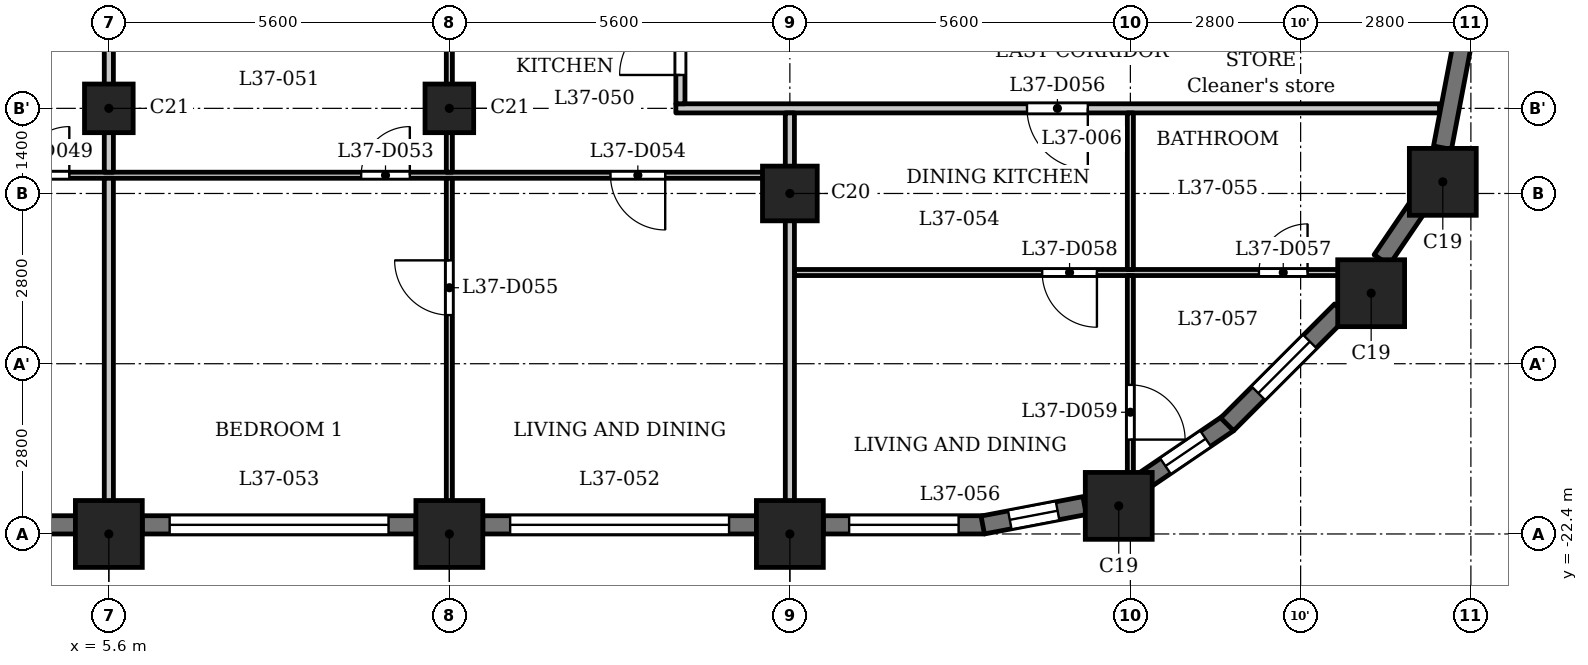
"""IFC4 building model, lengths in metres.
Left out: names, types, materials, properties, quantities, classifications, styles, units other than length and angle.
Written with IfcOpenShell. Run it as: python <this file> out.ifc"""

import sys

from ifc_helpers import new_model, si_unit, direction, frame, frame_2d, origin, origin_2d, place, context, subcontext, project, spatial, rectangle, extrude, element, fill, save


model = new_model("IFC4")
c1 = context("Model", 3, precision=1e-05, world=origin(), true_north=direction((0.0, 1.0)))
c2 = subcontext(c1, "Body", "Model", "MODEL_VIEW")
j1 = project(units=[si_unit("LENGTHUNIT", "METRE"), si_unit("PLANEANGLEUNIT", "RADIAN")], contexts=[c1])
p1 = place(None, origin())
s1 = spatial("IfcSite", under=j1, at=p1, CompositionType="ELEMENT")
p2 = place(p1, origin())
s2 = spatial("IfcBuilding", under=s1, at=p2, CompositionType="ELEMENT")
p3 = place(p2, frame((0.0, 0.0, 146.6)))
s3 = spatial("IfcBuildingStorey", under=s2, at=p3, CompositionType="ELEMENT", Elevation=146.6)
for number, where, z_axis, x_axis in (
    (1, (5.6, -22.4, 0.0), (0.0, 0.0, 1.0), (1.0, 0.0, 0.0)),
    (2, (11.2, -22.4, 0.0), (0.0, 0.0, 1.0), (1.0, 0.0, 0.0)),
    (3, (16.8, -22.4, 0.0), (0.0, 0.0, 1.0), (1.0, 0.0, 0.0)),
    (4, (22.209, -21.938, 0.0), (0.0, 0.0, 1.0), (1.0, 0.0, 0.0)),
    (5, (26.36, -18.44, 0.0), (0.0, 0.0, 1.0), (1.0, 0.0, 0.0)),
    (6, (27.538, -16.609, 0.0), (0.0, 0.0, 1.0), (1.0, 0.0, 0.0)),
):
    element("IfcColumn", number, at=place(p3, frame(where, z_axis=z_axis, x_axis=x_axis)), inside=s3, PredefinedType="COLUMN", context=c2, shape_type="SweptSolid", body=[
        extrude(rectangle(XDim=1.1, YDim=1.1, at=origin_2d()), origin(), (0.0, 0.0, 1.0), 3.5),
    ])
p4 = place(p3, frame((16.8, -16.8, 0.0), z_axis=(0.0, 0.0, 1.0), x_axis=(1.0, 0.0, 0.0)))
e7 = element("IfcColumn", 7, at=p4, inside=s3, PredefinedType="COLUMN", context=c2, shape_type="SweptSolid", body=[
    extrude(rectangle(XDim=0.9, YDim=0.9, at=origin_2d()), origin(), (0.0, 0.0, 1.0), 3.5),
])
for number, where, z_axis, x_axis in (
    (8, (5.6, -15.4, 0.0), (0.0, 0.0, 1.0), (1.0, 0.0, 0.0)),
    (9, (11.2, -15.4, 0.0), (0.0, 0.0, 1.0), (1.0, 0.0, 0.0)),
):
    element("IfcColumn", number, at=place(p3, frame(where, z_axis=z_axis, x_axis=x_axis)), inside=s3, PredefinedType="COLUMN", context=c2, shape_type="SweptSolid", body=[
        extrude(rectangle(XDim=0.8, YDim=0.8, at=origin_2d()), origin(), (0.0, 0.0, 1.0), 3.5),
    ])
p5 = place(p3, frame((0.55, -22.25, 0.0), z_axis=(0.0, 0.0, 1.0), x_axis=(1.0, 0.0, 0.0)))
e10 = element("IfcWall", 10, at=p5, inside=s3, PredefinedType="SOLIDWALL", context=c2, shape_type="SweptSolid", body=[
    extrude(rectangle(XDim=4.5, YDim=0.3, at=frame_2d((2.25, 0.0))), origin(), (0.0, 0.0, 1.0), 2.45),
])
p6 = place(p5, frame((0.45, 0.0, 1.2)))
e11 = element("IfcOpeningElement", 11, at=p6, cuts=e10, PredefinedType="OPENING", context=c2, shape_type="SweptSolid", body=[
    extrude(rectangle(XDim=3.6, YDim=0.95, at=frame_2d((1.8, 0.475))), frame((0.0, 0.16, 0.0), z_axis=(0.0, -1.0, 0.0), x_axis=(1.0, 0.0, 0.0)), (0.0, 0.0, 1.0), 0.32),
])
p7 = place(p3, frame((6.15, -22.25, 0.0), z_axis=(0.0, 0.0, 1.0), x_axis=(1.0, 0.0, 0.0)))
e12 = element("IfcWall", 12, at=p7, inside=s3, PredefinedType="SOLIDWALL", context=c2, shape_type="SweptSolid", body=[
    extrude(rectangle(XDim=4.5, YDim=0.3, at=frame_2d((2.25, 0.0))), origin(), (0.0, 0.0, 1.0), 2.45),
])
p8 = place(p7, frame((0.45, 0.0, 1.2)))
e13 = element("IfcOpeningElement", 13, at=p8, cuts=e12, PredefinedType="OPENING", context=c2, shape_type="SweptSolid", body=[
    extrude(rectangle(XDim=3.6, YDim=0.95, at=frame_2d((1.8, 0.475))), frame((0.0, 0.16, 0.0), z_axis=(0.0, -1.0, 0.0), x_axis=(1.0, 0.0, 0.0)), (0.0, 0.0, 1.0), 0.32),
])
p9 = place(p3, frame((11.75, -22.25, 0.0), z_axis=(0.0, 0.0, 1.0), x_axis=(1.0, 0.0, 0.0)))
e14 = element("IfcWall", 14, at=p9, inside=s3, PredefinedType="SOLIDWALL", context=c2, shape_type="SweptSolid", body=[
    extrude(rectangle(XDim=4.5, YDim=0.3, at=frame_2d((2.25, 0.0))), origin(), (0.0, 0.0, 1.0), 2.45),
])
p10 = place(p9, frame((0.45, 0.0, 1.2)))
e15 = element("IfcOpeningElement", 15, at=p10, cuts=e14, PredefinedType="OPENING", context=c2, shape_type="SweptSolid", body=[
    extrude(rectangle(XDim=3.6, YDim=0.95, at=frame_2d((1.8, 0.475))), frame((0.0, 0.16, 0.0), z_axis=(0.0, -1.0, 0.0), x_axis=(1.0, 0.0, 0.0)), (0.0, 0.0, 1.0), 0.32),
])
p11 = place(p3, frame((17.35, -22.25, 0.0), z_axis=(0.0, 0.0, 1.0), x_axis=(1.0, 0.0, 0.0)))
e16 = element("IfcWall", 16, at=p11, inside=s3, PredefinedType="SOLIDWALL", context=c2, shape_type="SweptSolid", body=[
    extrude(rectangle(XDim=2.65, YDim=0.3, at=frame_2d((1.325, 0.0))), origin(), (0.0, 0.0, 1.0), 2.45),
])
p12 = place(p11, frame((0.425, 0.0, 0.9)))
e17 = element("IfcOpeningElement", 17, at=p12, cuts=e16, PredefinedType="OPENING", context=c2, shape_type="SweptSolid", body=[
    extrude(rectangle(XDim=1.8, YDim=1.25, at=frame_2d((0.9, 0.625))), frame((0.0, 0.16, 0.0), z_axis=(0.0, -1.0, 0.0), x_axis=(1.0, 0.0, 0.0)), (0.0, 0.0, 1.0), 0.32),
])
p13 = place(p3, frame((19.972, -22.253, 0.0), z_axis=(0.0, 0.0, 1.0), x_axis=(0.982297206936, 0.187329114784, 0.0)))
e18 = element("IfcWall", 18, at=p13, inside=s3, PredefinedType="SOLIDWALL", context=c2, shape_type="SweptSolid", body=[
    extrude(rectangle(XDim=1.706, YDim=0.3, at=frame_2d((0.853, 0.0))), origin(), (0.0, 0.0, 1.0), 2.45),
])
p14 = place(p13, frame((0.453, 0.0, 0.6)))
e19 = element("IfcOpeningElement", 19, at=p14, cuts=e18, PredefinedType="OPENING", context=c2, shape_type="SweptSolid", body=[
    extrude(rectangle(XDim=0.8, YDim=1.55, at=frame_2d((0.4, 0.775))), frame((0.0, 0.16, 0.0), z_axis=(0.0, -1.0, 0.0), x_axis=(1.0, 0.0, 0.0)), (0.0, 0.0, 1.0), 0.32),
])
p15 = place(p3, frame((22.602, -21.538, 0.0), z_axis=(0.0, 0.0, 1.0), x_axis=(0.827040942766, 0.562141689424, 0.0)))
e20 = element("IfcWall", 20, at=p15, inside=s3, PredefinedType="SOLIDWALL", context=c2, shape_type="SweptSolid", body=[
    extrude(rectangle(XDim=1.706, YDim=0.3, at=frame_2d((0.853, 0.0))), origin(), (0.0, 0.0, 1.0), 2.45),
])
p16 = place(p15, frame((0.453, 0.0, 0.6)))
e21 = element("IfcOpeningElement", 21, at=p16, cuts=e20, PredefinedType="OPENING", context=c2, shape_type="SweptSolid", body=[
    extrude(rectangle(XDim=0.8, YDim=1.55, at=frame_2d((0.4, 0.775))), frame((0.0, 0.16, 0.0), z_axis=(0.0, -1.0, 0.0), x_axis=(1.0, 0.0, 0.0)), (0.0, 0.0, 1.0), 0.32),
])
p17 = place(p3, frame((23.991, -20.597, 0.0), z_axis=(0.0, 0.0, 1.0), x_axis=(0.707106781187, 0.707106781187, 0.0)))
e22 = element("IfcWall", 22, at=p17, inside=s3, PredefinedType="SOLIDWALL", context=c2, shape_type="SweptSolid", body=[
    extrude(rectangle(XDim=2.65, YDim=0.3, at=frame_2d((1.325, 0.0))), origin(), (0.0, 0.0, 1.0), 2.45),
])
p18 = place(p17, frame((0.725, 0.0, 0.6)))
e23 = element("IfcOpeningElement", 23, at=p18, cuts=e22, PredefinedType="OPENING", context=c2, shape_type="SweptSolid", body=[
    extrude(rectangle(XDim=1.2, YDim=1.55, at=frame_2d((0.6, 0.775))), frame((0.0, 0.16, 0.0), z_axis=(0.0, -1.0, 0.0), x_axis=(1.0, 0.0, 0.0)), (0.0, 0.0, 1.0), 0.32),
])
p19 = place(p3, frame((26.532, -17.893, 0.0), z_axis=(0.0, 0.0, 1.0), x_axis=(0.562105419172, 0.82706559458, 0.0)))
e24 = element("IfcWall", 24, at=p19, inside=s3, PredefinedType="SOLIDWALL", context=c2, shape_type="SweptSolid", body=[
    extrude(rectangle(XDim=1.077, YDim=0.3, at=frame_2d((0.539, 0.0))), origin(), (0.0, 0.0, 1.0), 3.2),
])
p20 = place(p3, frame((27.533, -16.048, 0.0), z_axis=(0.0, 0.0, 1.0), x_axis=(0.187302784601, 0.982302227871, 0.0)))
e25 = element("IfcWall", 25, at=p20, inside=s3, PredefinedType="SOLIDWALL", context=c2, shape_type="SweptSolid", body=[
    extrude(rectangle(XDim=1.706, YDim=0.3, at=frame_2d((0.853, 0.0))), origin(), (0.0, 0.0, 1.0), 2.45),
])
p21 = place(p3, frame((16.875, -18.1, 0.0), z_axis=(0.0, 0.0, 1.0), x_axis=(1.0, 0.0, 0.0)))
e26 = element("IfcWall", 26, at=p21, inside=s3, PredefinedType="PARTITIONING", context=c2, shape_type="SweptSolid", body=[
    extrude(rectangle(XDim=9.565, YDim=0.1, at=frame_2d((4.782, 0.0))), origin(), (0.0, 0.0, 1.0), 3.2),
])
p22 = place(p21, frame((7.639, 0.0, 0.0)))
e27 = element("IfcOpeningElement", 27, at=p22, cuts=e26, PredefinedType="OPENING", context=c2, shape_type="SweptSolid", body=[
    extrude(rectangle(XDim=0.8, YDim=2.1, at=frame_2d((0.4, 1.05))), frame((0.0, 0.06, 0.0), z_axis=(0.0, -1.0, 0.0), x_axis=(1.0, 0.0, 0.0)), (0.0, 0.0, 1.0), 0.12),
])
p23 = place(p21, frame((4.075, 0.0, 0.0)))
e28 = element("IfcOpeningElement", 28, at=p23, cuts=e26, PredefinedType="OPENING", context=c2, shape_type="SweptSolid", body=[
    extrude(rectangle(XDim=0.9, YDim=2.1, at=frame_2d((0.45, 1.05))), frame((0.0, 0.06, 0.0), z_axis=(0.0, -1.0, 0.0), x_axis=(1.0, 0.0, 0.0)), (0.0, 0.0, 1.0), 0.12),
])
p24 = place(p3, frame((-16.725, -16.5, 0.0), z_axis=(0.0, 0.0, 1.0), x_axis=(1.0, 0.0, 0.0)))
e29 = element("IfcWall", 29, at=p24, inside=s3, PredefinedType="PARTITIONING", context=c2, shape_type="SweptSolid", body=[
    extrude(rectangle(XDim=33.45, YDim=0.1, at=frame_2d((16.725, 0.0))), origin(), (0.0, 0.0, 1.0), 3.2),
])
p25 = place(p24, frame((9.675, 0.0, 0.0)))
e30 = element("IfcOpeningElement", 30, at=p25, cuts=e29, PredefinedType="OPENING", context=c2, shape_type="SweptSolid", body=[
    extrude(rectangle(XDim=0.8, YDim=2.1, at=frame_2d((0.4, 1.05))), frame((0.0, 0.06, 0.0), z_axis=(0.0, -1.0, 0.0), x_axis=(1.0, 0.0, 0.0)), (0.0, 0.0, 1.0), 0.12),
])
p26 = place(p24, frame((4.075, 0.0, 0.0)))
e31 = element("IfcOpeningElement", 31, at=p26, cuts=e29, PredefinedType="OPENING", context=c2, shape_type="SweptSolid", body=[
    extrude(rectangle(XDim=0.9, YDim=2.1, at=frame_2d((0.45, 1.05))), frame((0.0, 0.06, 0.0), z_axis=(0.0, -1.0, 0.0), x_axis=(1.0, 0.0, 0.0)), (0.0, 0.0, 1.0), 0.12),
])
p27 = place(p24, frame((20.875, 0.0, 0.0)))
e32 = element("IfcOpeningElement", 32, at=p27, cuts=e29, PredefinedType="OPENING", context=c2, shape_type="SweptSolid", body=[
    extrude(rectangle(XDim=0.8, YDim=2.1, at=frame_2d((0.4, 1.05))), frame((0.0, 0.06, 0.0), z_axis=(0.0, -1.0, 0.0), x_axis=(1.0, 0.0, 0.0)), (0.0, 0.0, 1.0), 0.12),
])
p28 = place(p24, frame((15.275, 0.0, 0.0)))
e33 = element("IfcOpeningElement", 33, at=p28, cuts=e29, PredefinedType="OPENING", context=c2, shape_type="SweptSolid", body=[
    extrude(rectangle(XDim=0.9, YDim=2.1, at=frame_2d((0.45, 1.05))), frame((0.0, 0.06, 0.0), z_axis=(0.0, -1.0, 0.0), x_axis=(1.0, 0.0, 0.0)), (0.0, 0.0, 1.0), 0.12),
])
p29 = place(p24, frame((26.475, 0.0, 0.0)))
e34 = element("IfcOpeningElement", 34, at=p29, cuts=e29, PredefinedType="OPENING", context=c2, shape_type="SweptSolid", body=[
    extrude(rectangle(XDim=0.8, YDim=2.1, at=frame_2d((0.4, 1.05))), frame((0.0, 0.06, 0.0), z_axis=(0.0, -1.0, 0.0), x_axis=(1.0, 0.0, 0.0)), (0.0, 0.0, 1.0), 0.12),
])
p30 = place(p24, frame((30.575, 0.0, 0.0)))
e35 = element("IfcOpeningElement", 35, at=p30, cuts=e29, PredefinedType="OPENING", context=c2, shape_type="SweptSolid", body=[
    extrude(rectangle(XDim=0.9, YDim=2.1, at=frame_2d((0.45, 1.05))), frame((0.0, 0.06, 0.0), z_axis=(0.0, -1.0, 0.0), x_axis=(1.0, 0.0, 0.0)), (0.0, 0.0, 1.0), 0.12),
])
p31 = place(p3, frame((14.925, -15.4, 0.0), z_axis=(0.0, 0.0, 1.0), x_axis=(1.0, 0.0, 0.0)))
e36 = element("IfcWall", 36, at=p31, inside=s3, PredefinedType="PARTITIONING", context=c2, shape_type="SweptSolid", body=[
    extrude(rectangle(XDim=12.559, YDim=0.15, at=frame_2d((6.279, 0.0))), origin(), (0.0, 0.0, 1.0), 3.2),
])
p32 = place(p31, frame((5.775, 0.0, 0.0)))
e37 = element("IfcOpeningElement", 37, at=p32, cuts=e36, PredefinedType="OPENING", context=c2, shape_type="SweptSolid", body=[
    extrude(rectangle(XDim=1.0, YDim=2.1, at=frame_2d((0.5, 1.05))), frame((0.0, 0.085, 0.0), z_axis=(0.0, -1.0, 0.0), x_axis=(1.0, 0.0, 0.0)), (0.0, 0.0, 1.0), 0.17),
])
p33 = place(p3, frame((5.6, -22.93, 0.0), z_axis=(0.0, 0.0, 1.0), x_axis=(0.0, 1.0, 0.0)))
e38 = element("IfcWall", 38, at=p33, inside=s3, PredefinedType="PARTITIONING", context=c2, shape_type="SweptSolid", body=[
    extrude(rectangle(XDim=6.38, YDim=0.15, at=frame_2d((3.19, 0.0))), origin(), (0.0, 0.0, 1.0), 3.2),
])
p34 = place(p3, frame((5.6, -16.45, 0.0), z_axis=(0.0, 0.0, 1.0), x_axis=(0.0, 1.0, 0.0)))
e39 = element("IfcWall", 39, at=p34, inside=s3, PredefinedType="PARTITIONING", context=c2, shape_type="SweptSolid", body=[
    extrude(rectangle(XDim=3.175, YDim=0.15, at=frame_2d((1.587, 0.0))), origin(), (0.0, 0.0, 1.0), 3.2),
])
p35 = place(p3, frame((11.2, -22.93, 0.0), z_axis=(0.0, 0.0, 1.0), x_axis=(0.0, 1.0, 0.0)))
e40 = element("IfcWall", 40, at=p35, inside=s3, PredefinedType="PARTITIONING", context=c2, shape_type="SweptSolid", body=[
    extrude(rectangle(XDim=6.38, YDim=0.1, at=frame_2d((3.19, 0.0))), origin(), (0.0, 0.0, 1.0), 3.2),
])
p36 = place(p35, frame((4.13, 0.0, 0.0)))
e41 = element("IfcOpeningElement", 41, at=p36, cuts=e40, PredefinedType="OPENING", context=c2, shape_type="SweptSolid", body=[
    extrude(rectangle(XDim=0.9, YDim=2.1, at=frame_2d((0.45, 1.05))), frame((0.0, 0.06, 0.0), z_axis=(0.0, -1.0, 0.0), x_axis=(1.0, 0.0, 0.0)), (0.0, 0.0, 1.0), 0.12),
])
p37 = place(p3, frame((11.2, -16.45, 0.0), z_axis=(0.0, 0.0, 1.0), x_axis=(0.0, 1.0, 0.0)))
e42 = element("IfcWall", 42, at=p37, inside=s3, PredefinedType="PARTITIONING", context=c2, shape_type="SweptSolid", body=[
    extrude(rectangle(XDim=3.175, YDim=0.1, at=frame_2d((1.587, 0.0))), origin(), (0.0, 0.0, 1.0), 3.2),
])
p38 = place(p3, frame((15.0, -15.325, 0.0), z_axis=(0.0, 0.0, 1.0), x_axis=(0.0, 1.0, 0.0)))
e43 = element("IfcWall", 43, at=p38, inside=s3, PredefinedType="PARTITIONING", context=c2, shape_type="SweptSolid", body=[
    extrude(rectangle(XDim=2.05, YDim=0.15, at=frame_2d((1.025, 0.0))), origin(), (0.0, 0.0, 1.0), 3.2),
])
p39 = place(p38, frame((0.474, 0.0, 0.0)))
e44 = element("IfcOpeningElement", 44, at=p39, cuts=e43, PredefinedType="OPENING", context=c2, shape_type="SweptSolid", body=[
    extrude(rectangle(XDim=1.0, YDim=2.1, at=frame_2d((0.5, 1.05))), frame((0.0, 0.085, 0.0), z_axis=(0.0, -1.0, 0.0), x_axis=(1.0, 0.0, 0.0)), (0.0, 0.0, 1.0), 0.17),
])
p40 = place(p3, frame((16.8, -22.93, 0.0), z_axis=(0.0, 0.0, 1.0), x_axis=(0.0, 1.0, 0.0)))
e45 = element("IfcWall", 45, at=p40, inside=s3, PredefinedType="PARTITIONING", context=c2, shape_type="SweptSolid", body=[
    extrude(rectangle(XDim=7.455, YDim=0.15, at=frame_2d((3.728, 0.0))), origin(), (0.0, 0.0, 1.0), 3.2),
])
p41 = place(p3, frame((22.4, -21.72, 0.0), z_axis=(0.0, 0.0, 1.0), x_axis=(0.0, 1.0, 0.0)))
e46 = element("IfcWall", 46, at=p41, inside=s3, PredefinedType="PARTITIONING", context=c2, shape_type="SweptSolid", body=[
    extrude(rectangle(XDim=3.57, YDim=0.1, at=frame_2d((1.785, 0.0))), origin(), (0.0, 0.0, 1.0), 3.2),
])
p42 = place(p41, frame((0.872, 0.0, 0.0)))
e47 = element("IfcOpeningElement", 47, at=p42, cuts=e46, PredefinedType="OPENING", context=c2, shape_type="SweptSolid", body=[
    extrude(rectangle(XDim=0.9, YDim=2.1, at=frame_2d((0.45, 1.05))), frame((0.0, 0.06, 0.0), z_axis=(0.0, -1.0, 0.0), x_axis=(1.0, 0.0, 0.0)), (0.0, 0.0, 1.0), 0.12),
])
p43 = place(p3, frame((22.4, -18.05, 0.0), z_axis=(0.0, 0.0, 1.0), x_axis=(0.0, 1.0, 0.0)))
e48 = element("IfcWall", 48, at=p43, inside=s3, PredefinedType="PARTITIONING", context=c2, shape_type="SweptSolid", body=[
    extrude(rectangle(XDim=2.575, YDim=0.1, at=frame_2d((1.288, 0.0))), origin(), (0.0, 0.0, 1.0), 3.2),
])
p44 = place(p27, origin())
e49 = element("IfcDoor", 49, at=p44, inside=s3, OperationType="SINGLE_SWING_LEFT", PredefinedType="DOOR", context=c2, shape_type="SweptSolid", body=[
    extrude(rectangle(XDim=0.8, YDim=2.1, at=frame_2d((0.4, 1.05))), frame((0.0, 0.025, 0.0), z_axis=(0.0, -1.0, 0.0), x_axis=(1.0, 0.0, 0.0)), (0.0, 0.0, 1.0), 0.05),
])
fill(e32, e49)
p45 = place(p39, origin())
e50 = element("IfcDoor", 50, at=p45, inside=s3, OperationType="SINGLE_SWING_RIGHT", PredefinedType="DOOR", context=c2, shape_type="SweptSolid", body=[
    extrude(rectangle(XDim=1.0, YDim=2.1, at=frame_2d((0.5, 1.05))), frame((0.0, 0.025, 0.0), z_axis=(0.0, -1.0, 0.0), x_axis=(1.0, 0.0, 0.0)), (0.0, 0.0, 1.0), 0.05),
])
fill(e44, e50)
p46 = place(p29, origin())
e51 = element("IfcDoor", 51, at=p46, inside=s3, OperationType="SINGLE_SWING_LEFT", PredefinedType="DOOR", context=c2, shape_type="SweptSolid", body=[
    extrude(rectangle(XDim=0.8, YDim=2.1, at=frame_2d((0.4, 1.05))), frame((0.0, 0.025, 0.0), z_axis=(0.0, -1.0, 0.0), x_axis=(1.0, 0.0, 0.0)), (0.0, 0.0, 1.0), 0.05),
])
fill(e34, e51)
p47 = place(p30, origin())
e52 = element("IfcDoor", 52, at=p47, inside=s3, OperationType="SINGLE_SWING_RIGHT", PredefinedType="DOOR", context=c2, shape_type="SweptSolid", body=[
    extrude(rectangle(XDim=0.9, YDim=2.1, at=frame_2d((0.45, 1.05))), frame((0.0, 0.025, 0.0), z_axis=(0.0, -1.0, 0.0), x_axis=(1.0, 0.0, 0.0)), (0.0, 0.0, 1.0), 0.05),
])
fill(e35, e52)
p48 = place(p36, origin())
e53 = element("IfcDoor", 53, at=p48, inside=s3, OperationType="SINGLE_SWING_LEFT", PredefinedType="DOOR", context=c2, shape_type="SweptSolid", body=[
    extrude(rectangle(XDim=0.9, YDim=2.1, at=frame_2d((0.45, 1.05))), frame((0.0, 0.025, 0.0), z_axis=(0.0, -1.0, 0.0), x_axis=(1.0, 0.0, 0.0)), (0.0, 0.0, 1.0), 0.05),
])
fill(e41, e53)
p49 = place(p32, origin())
e54 = element("IfcDoor", 54, at=p49, inside=s3, OperationType="SINGLE_SWING_RIGHT", PredefinedType="DOOR", context=c2, shape_type="SweptSolid", body=[
    extrude(rectangle(XDim=1.0, YDim=2.1, at=frame_2d((0.5, 1.05))), frame((0.0, 0.025, 0.0), z_axis=(0.0, -1.0, 0.0), x_axis=(1.0, 0.0, 0.0)), (0.0, 0.0, 1.0), 0.05),
])
fill(e37, e54)
p50 = place(p22, origin())
e55 = element("IfcDoor", 55, at=p50, inside=s3, OperationType="SINGLE_SWING_LEFT", PredefinedType="DOOR", context=c2, shape_type="SweptSolid", body=[
    extrude(rectangle(XDim=0.8, YDim=2.1, at=frame_2d((0.4, 1.05))), frame((0.0, 0.025, 0.0), z_axis=(0.0, -1.0, 0.0), x_axis=(1.0, 0.0, 0.0)), (0.0, 0.0, 1.0), 0.05),
])
fill(e27, e55)
p51 = place(p23, origin())
e56 = element("IfcDoor", 56, at=p51, inside=s3, OperationType="SINGLE_SWING_RIGHT", PredefinedType="DOOR", context=c2, shape_type="SweptSolid", body=[
    extrude(rectangle(XDim=0.9, YDim=2.1, at=frame_2d((0.45, 1.05))), frame((0.0, 0.025, 0.0), z_axis=(0.0, -1.0, 0.0), x_axis=(1.0, 0.0, 0.0)), (0.0, 0.0, 1.0), 0.05),
])
fill(e28, e56)
p52 = place(p42, origin())
e57 = element("IfcDoor", 57, at=p52, inside=s3, OperationType="SINGLE_SWING_LEFT", PredefinedType="DOOR", context=c2, shape_type="SweptSolid", body=[
    extrude(rectangle(XDim=0.9, YDim=2.1, at=frame_2d((0.45, 1.05))), frame((0.0, 0.025, 0.0), z_axis=(0.0, -1.0, 0.0), x_axis=(1.0, 0.0, 0.0)), (0.0, 0.0, 1.0), 0.05),
])
fill(e47, e57)
p53 = place(p8, origin())
e58 = element("IfcWindow", 58, at=p53, inside=s3, PartitioningType="SINGLE_PANEL", PredefinedType="WINDOW", context=c2, shape_type="SweptSolid", body=[
    extrude(rectangle(XDim=3.6, YDim=0.95, at=frame_2d((1.8, 0.475))), frame((0.0, 0.03, 0.0), z_axis=(0.0, -1.0, 0.0), x_axis=(1.0, 0.0, 0.0)), (0.0, 0.0, 1.0), 0.06),
])
fill(e13, e58)
p54 = place(p10, origin())
e59 = element("IfcWindow", 59, at=p54, inside=s3, PartitioningType="SINGLE_PANEL", PredefinedType="WINDOW", context=c2, shape_type="SweptSolid", body=[
    extrude(rectangle(XDim=3.6, YDim=0.95, at=frame_2d((1.8, 0.475))), frame((0.0, 0.03, 0.0), z_axis=(0.0, -1.0, 0.0), x_axis=(1.0, 0.0, 0.0)), (0.0, 0.0, 1.0), 0.06),
])
fill(e15, e59)
p55 = place(p12, origin())
e60 = element("IfcWindow", 60, at=p55, inside=s3, PartitioningType="SINGLE_PANEL", PredefinedType="WINDOW", context=c2, shape_type="SweptSolid", body=[
    extrude(rectangle(XDim=1.8, YDim=1.25, at=frame_2d((0.9, 0.625))), frame((0.0, 0.03, 0.0), z_axis=(0.0, -1.0, 0.0), x_axis=(1.0, 0.0, 0.0)), (0.0, 0.0, 1.0), 0.06),
])
fill(e17, e60)
p56 = place(p14, origin())
e61 = element("IfcWindow", 61, at=p56, inside=s3, PartitioningType="SINGLE_PANEL", PredefinedType="WINDOW", context=c2, shape_type="SweptSolid", body=[
    extrude(rectangle(XDim=0.8, YDim=1.55, at=frame_2d((0.4, 0.775))), frame((0.0, 0.03, 0.0), z_axis=(0.0, -1.0, 0.0), x_axis=(1.0, 0.0, 0.0)), (0.0, 0.0, 1.0), 0.06),
])
fill(e19, e61)
p57 = place(p16, origin())
e62 = element("IfcWindow", 62, at=p57, inside=s3, PartitioningType="SINGLE_PANEL", PredefinedType="WINDOW", context=c2, shape_type="SweptSolid", body=[
    extrude(rectangle(XDim=0.8, YDim=1.55, at=frame_2d((0.4, 0.775))), frame((0.0, 0.03, 0.0), z_axis=(0.0, -1.0, 0.0), x_axis=(1.0, 0.0, 0.0)), (0.0, 0.0, 1.0), 0.06),
])
fill(e21, e62)
p58 = place(p18, origin())
e63 = element("IfcWindow", 63, at=p58, inside=s3, PartitioningType="SINGLE_PANEL", PredefinedType="WINDOW", context=c2, shape_type="SweptSolid", body=[
    extrude(rectangle(XDim=1.2, YDim=1.55, at=frame_2d((0.6, 0.775))), frame((0.0, 0.03, 0.0), z_axis=(0.0, -1.0, 0.0), x_axis=(1.0, 0.0, 0.0)), (0.0, 0.0, 1.0), 0.06),
])
fill(e23, e63)
save(model, sys.argv[1])
